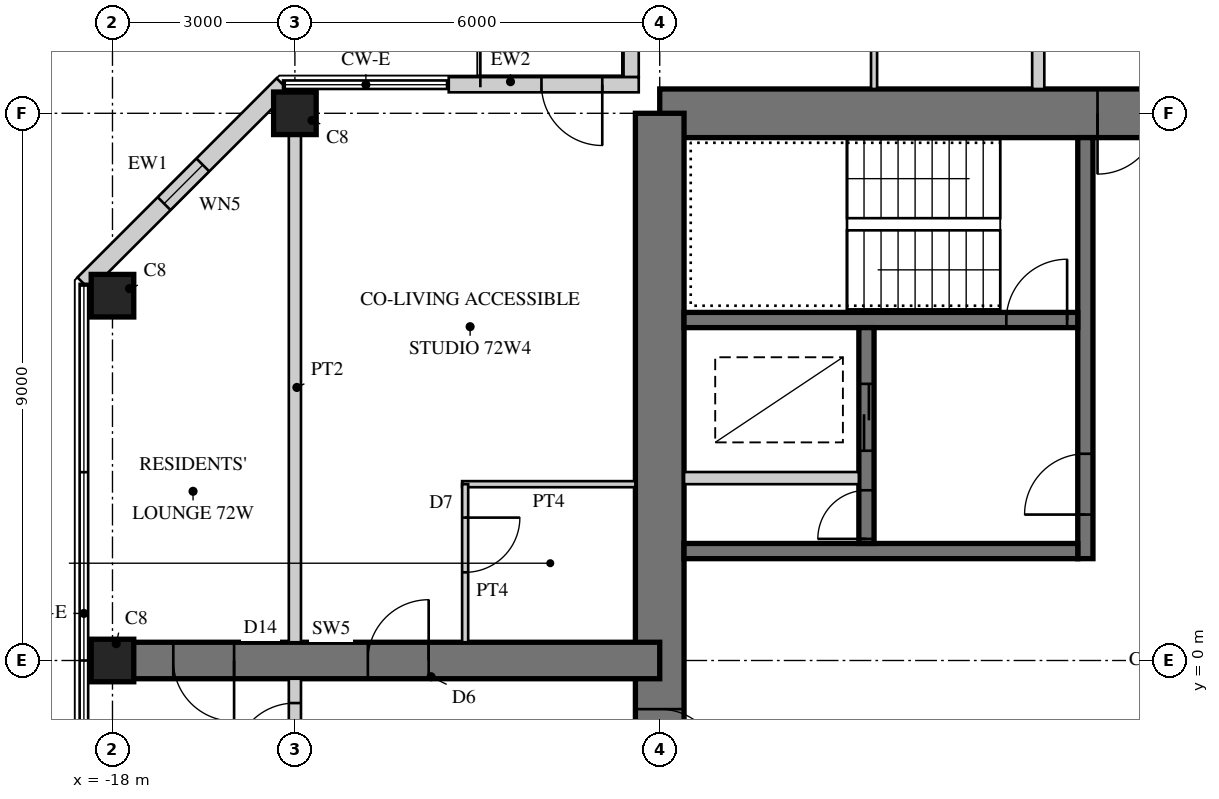
"""IFC4 building model, lengths in metres.
Left out: names, types, materials, properties, quantities, classifications, styles, units other than length and angle.
Written with IfcOpenShell. Run it as: python <this file> out.ifc"""

import sys

from ifc_helpers import new_model, si_unit, direction, frame, frame_2d, origin, origin_2d, place, context, subcontext, project, spatial, rectangle, hollow_rectangle, extrude, element, fill, save


model = new_model("IFC4")
c1 = context("Model", 3, precision=1e-05, world=origin(), true_north=direction((0.0, 1.0)))
c2 = subcontext(c1, "Body", "Model", "MODEL_VIEW")
j1 = project(units=[si_unit("LENGTHUNIT", "METRE"), si_unit("PLANEANGLEUNIT", "RADIAN")], contexts=[c1])
p1 = place(None, origin())
s1 = spatial("IfcSite", under=j1, at=p1, CompositionType="ELEMENT")
p2 = place(p1, origin())
s2 = spatial("IfcBuilding", under=s1, at=p2, CompositionType="ELEMENT")
p3 = place(p2, frame((0.0, 0.0, 278.1)))
s3 = spatial("IfcBuildingStorey", under=s2, at=p3, CompositionType="ELEMENT", Elevation=278.1)
p4 = place(p3, frame((9.0, 9.0, 0.0), z_axis=(0.0, 0.0, 1.0), x_axis=(-1.0, 0.0, 0.0)))
e1 = element("IfcWall", 1, at=p4, inside=s3, PredefinedType="SHEAR", context=c2, shape_type="SweptSolid", body=[
    extrude(rectangle(XDim=18.0, YDim=0.8, at=frame_2d((9.0, 0.0))), origin(), (0.0, 0.0, 1.0), 3.4),
])
p5 = place(p4, frame((9.8, 0.0, 0.0)))
e2 = element("IfcOpeningElement", 2, at=p5, cuts=e1, PredefinedType="OPENING", context=c2, shape_type="SweptSolid", body=[
    extrude(rectangle(XDim=1.0, YDim=2.4, at=frame_2d((0.5, 1.2))), frame((0.0, 0.41, 0.0), z_axis=(0.0, -1.0, 0.0), x_axis=(1.0, 0.0, 0.0)), (0.0, 0.0, 1.0), 0.82),
])
p6 = place(p3, frame((-9.0, 9.0, 0.0), z_axis=(0.0, 0.0, 1.0), x_axis=(0.0, -1.0, 0.0)))
e3 = element("IfcWall", 3, at=p6, inside=s3, PredefinedType="SHEAR", context=c2, shape_type="SweptSolid", body=[
    extrude(rectangle(XDim=18.0, YDim=0.8, at=frame_2d((9.0, 0.0))), origin(), (0.0, 0.0, 1.0), 3.4),
])
p7 = place(p6, frame((9.8, 0.0, 0.0)))
e4 = element("IfcOpeningElement", 4, at=p7, cuts=e3, PredefinedType="OPENING", context=c2, shape_type="SweptSolid", body=[
    extrude(rectangle(XDim=1.0, YDim=2.4, at=frame_2d((0.5, 1.2))), frame((0.0, 0.41, 0.0), z_axis=(0.0, -1.0, 0.0), x_axis=(1.0, 0.0, 0.0)), (0.0, 0.0, 1.0), 0.82),
])
p8 = place(p3, frame((-2.0, 1.675, 0.0), z_axis=(0.0, 0.0, 1.0), x_axis=(0.0, 1.0, 0.0)))
e5 = element("IfcWall", 5, at=p8, inside=s3, PredefinedType="SHEAR", context=c2, shape_type="SweptSolid", body=[
    extrude(rectangle(XDim=6.925, YDim=0.25, at=frame_2d((3.462, 0.0))), origin(), (0.0, 0.0, 1.0), 3.4),
])
p9 = place(p8, frame((0.725, 0.0, 0.0)))
e6 = element("IfcOpeningElement", 6, at=p9, cuts=e5, PredefinedType="OPENING", context=c2, shape_type="SweptSolid", body=[
    extrude(rectangle(XDim=1.0, YDim=2.1, at=frame_2d((0.5, 1.05))), frame((0.0, 0.135, 0.0), z_axis=(0.0, -1.0, 0.0), x_axis=(1.0, 0.0, 0.0)), (0.0, 0.0, 1.0), 0.27),
])
p10 = place(p3, frame((-2.125, 1.8, 0.0), z_axis=(0.0, 0.0, 1.0), x_axis=(-1.0, 0.0, 0.0)))
e7 = element("IfcWall", 7, at=p10, inside=s3, PredefinedType="SHEAR", context=c2, shape_type="SweptSolid", body=[
    extrude(rectangle(XDim=6.475, YDim=0.25, at=frame_2d((3.238, 0.0))), origin(), (0.0, 0.0, 1.0), 3.4),
])
p11 = place(p3, frame((-2.125, 5.6, 0.0), z_axis=(0.0, 0.0, 1.0), x_axis=(-1.0, 0.0, 0.0)))
e8 = element("IfcWall", 8, at=p11, inside=s3, PredefinedType="SHEAR", context=c2, shape_type="SweptSolid", body=[
    extrude(rectangle(XDim=6.475, YDim=0.25, at=frame_2d((3.238, 0.0))), origin(), (0.0, 0.0, 1.0), 3.4),
])
p12 = place(p11, frame((0.175, 0.0, 0.0)))
e9 = element("IfcOpeningElement", 9, at=p12, cuts=e8, PredefinedType="OPENING", context=c2, shape_type="SweptSolid", body=[
    extrude(rectangle(XDim=1.0, YDim=2.1, at=frame_2d((0.5, 1.05))), frame((0.0, 0.135, 0.0), z_axis=(0.0, -1.0, 0.0), x_axis=(1.0, 0.0, 0.0)), (0.0, 0.0, 1.0), 0.27),
])
p13 = place(p3, frame((-5.6, 1.925, 0.0), z_axis=(0.0, 0.0, 1.0), x_axis=(0.0, 1.0, 0.0)))
e10 = element("IfcWall", 10, at=p13, inside=s3, PredefinedType="SHEAR", context=c2, shape_type="SweptSolid", body=[
    extrude(rectangle(XDim=3.55, YDim=0.25, at=frame_2d((1.775, 0.0))), origin(), (0.0, 0.0, 1.0), 3.4),
])
p14 = place(p13, frame((1.525, 0.0, 0.0)))
e11 = element("IfcOpeningElement", 11, at=p14, cuts=e10, PredefinedType="OPENING", context=c2, shape_type="SweptSolid", body=[
    extrude(rectangle(XDim=1.1, YDim=2.2, at=frame_2d((0.55, 1.1))), frame((0.0, 0.135, 0.0), z_axis=(0.0, -1.0, 0.0), x_axis=(1.0, 0.0, 0.0)), (0.0, 0.0, 1.0), 0.27),
])
p15 = place(p13, frame((0.075, 0.0, 0.0)))
e12 = element("IfcOpeningElement", 12, at=p15, cuts=e10, PredefinedType="OPENING", context=c2, shape_type="SweptSolid", body=[
    extrude(rectangle(XDim=0.8, YDim=2.1, at=frame_2d((0.4, 1.05))), frame((0.0, 0.135, 0.0), z_axis=(0.0, -1.0, 0.0), x_axis=(1.0, 0.0, 0.0)), (0.0, 0.0, 1.0), 0.27),
])
p16 = place(p3, frame((-5.725, 3.0, 0.0), z_axis=(0.0, 0.0, 1.0), x_axis=(-1.0, 0.0, 0.0)))
e13 = element("IfcWall", 13, at=p16, inside=s3, PredefinedType="PARTITIONING", context=c2, shape_type="SweptSolid", body=[
    extrude(rectangle(XDim=2.875, YDim=0.2, at=frame_2d((1.438, 0.0))), origin(), (0.0, 0.0, 1.0), 3.4),
])
p17 = place(p3, frame((-9.0, 0.0, 0.0), z_axis=(0.0, 0.0, 1.0), x_axis=(-1.0, 0.0, 0.0)))
e14 = element("IfcWall", 14, at=p17, inside=s3, PredefinedType="SHEAR", context=c2, shape_type="SweptSolid", body=[
    extrude(rectangle(XDim=9.0, YDim=0.6, at=frame_2d((4.5, 0.0))), origin(), (0.0, 0.0, 1.0), 3.4),
])
p18 = place(p17, frame((3.8, 0.0, 0.0)))
e15 = element("IfcOpeningElement", 15, at=p18, cuts=e14, PredefinedType="OPENING", context=c2, shape_type="SweptSolid", body=[
    extrude(rectangle(XDim=1.0, YDim=2.15, at=frame_2d((0.5, 1.075))), frame((0.0, 0.31, 0.0), z_axis=(0.0, -1.0, 0.0), x_axis=(1.0, 0.0, 0.0)), (0.0, 0.0, 1.0), 0.62),
])
p19 = place(p17, frame((7.0, 0.0, 0.0)))
e16 = element("IfcOpeningElement", 16, at=p19, cuts=e14, PredefinedType="OPENING", context=c2, shape_type="SweptSolid", body=[
    extrude(rectangle(XDim=1.0, YDim=2.2, at=frame_2d((0.5, 1.1))), frame((0.0, 0.31, 0.0), z_axis=(0.0, -1.0, 0.0), x_axis=(1.0, 0.0, 0.0)), (0.0, 0.0, 1.0), 0.62),
])
for number, where, z_axis, x_axis in (
    (17, (-15.0, 9.0, 0.0), (0.0, 0.0, 1.0), (1.0, 0.0, 0.0)),
    (18, (-18.0, 6.0, 0.0), (0.0, 0.0, 1.0), (1.0, 0.0, 0.0)),
    (19, (-18.0, 0.0, 0.0), (0.0, 0.0, 1.0), (1.0, 0.0, 0.0)),
):
    element("IfcColumn", number, at=place(p3, frame(where, z_axis=z_axis, x_axis=x_axis)), inside=s3, PredefinedType="COLUMN", context=c2, shape_type="SweptSolid", body=[
        extrude(rectangle(XDim=0.7, YDim=0.7, at=origin_2d()), origin(), (0.0, 0.0, 1.0), 3.4),
    ])
p20 = place(p3, frame((-9.47, 12.47, 0.0), z_axis=(0.0, 0.0, 1.0), x_axis=(0.0, -1.0, 0.0)))
e20 = element("IfcWall", 20, at=p20, inside=s3, PredefinedType="SOLIDWALL", context=c2, shape_type="SweptSolid", body=[
    extrude(rectangle(XDim=2.875, YDim=0.25, at=frame_2d((1.438, 0.0))), origin(), (0.0, 0.0, 1.0), 3.22),
])
p21 = place(p20, frame((0.6, 0.0, 0.0)))
e21 = element("IfcOpeningElement", 21, at=p21, cuts=e20, PredefinedType="OPENING", context=c2, shape_type="SweptSolid", body=[
    extrude(rectangle(XDim=1.0, YDim=2.2, at=frame_2d((0.5, 1.1))), frame((0.0, 0.135, 0.0), z_axis=(0.0, -1.0, 0.0), x_axis=(1.0, 0.0, 0.0)), (0.0, 0.0, 1.0), 0.27),
])
p22 = place(p3, frame((-9.345, 9.47, 0.0), z_axis=(0.0, 0.0, 1.0), x_axis=(-1.0, 0.0, 0.0)))
e22 = element("IfcWall", 22, at=p22, inside=s3, PredefinedType="SOLIDWALL", context=c2, shape_type="SweptSolid", body=[
    extrude(rectangle(XDim=3.125, YDim=0.25, at=frame_2d((1.562, 0.0))), origin(), (0.0, 0.0, 1.0), 3.22),
])
p23 = place(p22, frame((0.6, 0.0, 0.0)))
e23 = element("IfcOpeningElement", 23, at=p23, cuts=e22, PredefinedType="OPENING", context=c2, shape_type="SweptSolid", body=[
    extrude(rectangle(XDim=1.0, YDim=2.2, at=frame_2d((0.5, 1.1))), frame((0.0, 0.135, 0.0), z_axis=(0.0, -1.0, 0.0), x_axis=(1.0, 0.0, 0.0)), (0.0, 0.0, 1.0), 0.27),
])
p24 = place(p3, frame((-15.195, 9.47, 0.0), z_axis=(0.0, 0.0, 1.0), x_axis=(-0.707106781187, -0.707106781187, 0.0)))
e24 = element("IfcWall", 24, at=p24, inside=s3, PredefinedType="SOLIDWALL", context=c2, shape_type="SweptSolid", body=[
    extrude(rectangle(XDim=4.632, YDim=0.3, at=frame_2d((2.316, 0.0))), origin(), (0.0, 0.0, 1.0), 3.22),
])
p25 = place(p24, frame((1.866, 0.0, 0.3)))
e25 = element("IfcOpeningElement", 25, at=p25, cuts=e24, PredefinedType="OPENING", context=c2, shape_type="SweptSolid", body=[
    extrude(rectangle(XDim=0.9, YDim=2.4, at=frame_2d((0.45, 1.2))), frame((0.0, 0.16, 0.0), z_axis=(0.0, -1.0, 0.0), x_axis=(1.0, 0.0, 0.0)), (0.0, 0.0, 1.0), 0.32),
])
p26 = place(p3, frame((-5.475, 9.4, 0.0), z_axis=(0.0, 0.0, 1.0), x_axis=(0.0, 1.0, 0.0)))
e26 = element("IfcWall", 26, at=p26, inside=s3, PredefinedType="PARTITIONING", context=c2, shape_type="SweptSolid", body=[
    extrude(rectangle(XDim=2.85, YDim=0.1, at=frame_2d((1.425, 0.0))), origin(), (0.0, 0.0, 1.0), 3.22),
])
p27 = place(p3, frame((-2.775, 9.4, 0.0), z_axis=(0.0, 0.0, 1.0), x_axis=(0.0, 1.0, 0.0)))
e27 = element("IfcWall", 27, at=p27, inside=s3, PredefinedType="SOLIDWALL", context=c2, shape_type="SweptSolid", body=[
    extrude(rectangle(XDim=5.6, YDim=0.2, at=frame_2d((2.8, 0.0))), origin(), (0.0, 0.0, 1.0), 3.22),
])
p28 = place(p27, frame((3.4, 0.0, 0.0)))
e28 = element("IfcOpeningElement", 28, at=p28, cuts=e27, PredefinedType="OPENING", context=c2, shape_type="SweptSolid", body=[
    extrude(rectangle(XDim=1.0, YDim=2.15, at=frame_2d((0.5, 1.075))), frame((0.0, 0.11, 0.0), z_axis=(0.0, -1.0, 0.0), x_axis=(1.0, 0.0, 0.0)), (0.0, 0.0, 1.0), 0.22),
])
p29 = place(p3, frame((-9.4, 2.9, 0.0), z_axis=(0.0, 0.0, 1.0), x_axis=(-1.0, 0.0, 0.0)))
e29 = element("IfcWall", 29, at=p29, inside=s3, PredefinedType="PARTITIONING", context=c2, shape_type="SweptSolid", body=[
    extrude(rectangle(XDim=2.85, YDim=0.1, at=frame_2d((1.425, 0.0))), origin(), (0.0, 0.0, 1.0), 3.22),
])
p30 = place(p3, frame((-12.2, 2.9, 0.0), z_axis=(0.0, 0.0, 1.0), x_axis=(0.0, -1.0, 0.0)))
e30 = element("IfcWall", 30, at=p30, inside=s3, PredefinedType="PARTITIONING", context=c2, shape_type="SweptSolid", body=[
    extrude(rectangle(XDim=2.6, YDim=0.1, at=frame_2d((1.3, 0.0))), origin(), (0.0, 0.0, 1.0), 3.22),
])
p31 = place(p30, frame((0.55, 0.0, 0.0)))
e31 = element("IfcOpeningElement", 31, at=p31, cuts=e30, PredefinedType="OPENING", context=c2, shape_type="SweptSolid", body=[
    extrude(rectangle(XDim=0.9, YDim=2.1, at=frame_2d((0.45, 1.05))), frame((0.0, 0.06, 0.0), z_axis=(0.0, -1.0, 0.0), x_axis=(1.0, 0.0, 0.0)), (0.0, 0.0, 1.0), 0.12),
])
p32 = place(p3, frame((-15.0, 8.65, 0.0), z_axis=(0.0, 0.0, 1.0), x_axis=(0.0, -1.0, 0.0)))
e32 = element("IfcWall", 32, at=p32, inside=s3, PredefinedType="SOLIDWALL", context=c2, shape_type="SweptSolid", body=[
    extrude(rectangle(XDim=8.35, YDim=0.2, at=frame_2d((4.175, 0.0))), origin(), (0.0, 0.0, 1.0), 2.52),
])
p33 = place(p3, frame((-15.0, -0.3, 0.0), z_axis=(0.0, 0.0, 1.0), x_axis=(0.0, -1.0, 0.0)))
e33 = element("IfcWall", 33, at=p33, inside=s3, PredefinedType="SOLIDWALL", context=c2, shape_type="SweptSolid", body=[
    extrude(rectangle(XDim=8.35, YDim=0.2, at=frame_2d((4.175, 0.0))), origin(), (0.0, 0.0, 1.0), 2.52),
])
p34 = place(p33, frame((0.4, 0.0, 0.0)))
e34 = element("IfcOpeningElement", 34, at=p34, cuts=e33, PredefinedType="OPENING", context=c2, shape_type="SweptSolid", body=[
    extrude(rectangle(XDim=1.0, YDim=2.2, at=frame_2d((0.5, 1.1))), frame((0.0, 0.11, 0.0), z_axis=(0.0, -1.0, 0.0), x_axis=(1.0, 0.0, 0.0)), (0.0, 0.0, 1.0), 0.22),
])
p35 = place(p23, origin())
e35 = element("IfcDoor", 35, at=p35, inside=s3, OperationType="SINGLE_SWING_LEFT", PredefinedType="DOOR", context=c2, shape_type="SweptSolid", body=[
    extrude(hollow_rectangle(XDim=1.0, YDim=2.2, WallThickness=0.06, at=frame_2d((0.5, 1.1))), frame((0.0, 0.025, 0.0), z_axis=(0.0, -1.0, 0.0), x_axis=(1.0, 0.0, 0.0)), (0.0, 0.0, 1.0), 0.05),
    extrude(rectangle(XDim=0.879, YDim=2.079, at=frame_2d((0.5, 1.1))), frame((0.0, 0.025, 0.0), z_axis=(0.0, -1.0, 0.0), x_axis=(1.0, 0.0, 0.0)), (0.0, 0.0, 1.0), 0.05),
])
fill(e23, e35)
p36 = place(p25, origin())
e36 = element("IfcWindow", 36, at=p36, inside=s3, PartitioningType="SINGLE_PANEL", PredefinedType="WINDOW", context=c2, shape_type="SweptSolid", body=[
    extrude(hollow_rectangle(XDim=0.9, YDim=2.4, WallThickness=0.06, at=frame_2d((0.45, 1.2))), frame((0.0, 0.03, 0.0), z_axis=(0.0, -1.0, 0.0), x_axis=(1.0, 0.0, 0.0)), (0.0, 0.0, 1.0), 0.06),
    extrude(rectangle(XDim=0.779, YDim=2.279, at=frame_2d((0.45, 1.2))), frame((0.0, 0.03, 0.0), z_axis=(0.0, -1.0, 0.0), x_axis=(1.0, 0.0, 0.0)), (0.0, 0.0, 1.0), 0.06),
])
fill(e25, e36)
p37 = place(p31, origin())
e37 = element("IfcDoor", 37, at=p37, inside=s3, OperationType="SINGLE_SWING_LEFT", PredefinedType="DOOR", context=c2, shape_type="SweptSolid", body=[
    extrude(rectangle(XDim=0.9, YDim=2.1, at=frame_2d((0.45, 1.05))), frame((0.0, 0.025, 0.0), z_axis=(0.0, -1.0, 0.0), x_axis=(1.0, 0.0, 0.0)), (0.0, 0.0, 1.0), 0.05),
])
fill(e31, e37)
p38 = place(p34, frame((1.0, 0.0, 0.0), z_axis=(0.0, 0.0, 1.0), x_axis=(-1.0, 0.0, 0.0)))
e38 = element("IfcDoor", 38, at=p38, inside=s3, OperationType="SINGLE_SWING_LEFT", PredefinedType="DOOR", context=c2, shape_type="SweptSolid", body=[
    extrude(rectangle(XDim=1.0, YDim=2.2, at=frame_2d((0.5, 1.1))), frame((0.0, 0.025, 0.0), z_axis=(0.0, -1.0, 0.0), x_axis=(1.0, 0.0, 0.0)), (0.0, 0.0, 1.0), 0.05),
])
fill(e34, e38)
p39 = place(p18, frame((1.0, 0.0, 0.0), z_axis=(0.0, 0.0, 1.0), x_axis=(-1.0, 0.0, 0.0)))
e39 = element("IfcDoor", 39, at=p39, inside=s3, OperationType="SINGLE_SWING_RIGHT", PredefinedType="DOOR", context=c2, shape_type="SweptSolid", body=[
    extrude(rectangle(XDim=1.0, YDim=2.15, at=frame_2d((0.5, 1.075))), frame((0.0, 0.025, 0.0), z_axis=(0.0, -1.0, 0.0), x_axis=(1.0, 0.0, 0.0)), (0.0, 0.0, 1.0), 0.05),
])
fill(e15, e39)
p40 = place(p19, origin())
e40 = element("IfcDoor", 40, at=p40, inside=s3, OperationType="SINGLE_SWING_LEFT", PredefinedType="DOOR", context=c2, shape_type="SweptSolid", body=[
    extrude(rectangle(XDim=1.0, YDim=2.2, at=frame_2d((0.5, 1.1))), frame((0.0, 0.025, 0.0), z_axis=(0.0, -1.0, 0.0), x_axis=(1.0, 0.0, 0.0)), (0.0, 0.0, 1.0), 0.05),
])
fill(e16, e40)
p41 = place(p5, origin())
e41 = element("IfcDoor", 41, at=p41, inside=s3, OperationType="SINGLE_SWING_RIGHT", PredefinedType="DOOR", context=c2, shape_type="SweptSolid", body=[
    extrude(rectangle(XDim=1.0, YDim=2.4, at=frame_2d((0.5, 1.2))), frame((0.0, 0.055, 0.0), z_axis=(0.0, -1.0, 0.0), x_axis=(1.0, 0.0, 0.0)), (0.0, 0.0, 1.0), 0.05),
])
fill(e2, e41)
p42 = place(p7, origin())
e42 = element("IfcDoor", 42, at=p42, inside=s3, OperationType="SINGLE_SWING_RIGHT", PredefinedType="DOOR", context=c2, shape_type="SweptSolid", body=[
    extrude(rectangle(XDim=1.0, YDim=2.4, at=frame_2d((0.5, 1.2))), frame((0.0, 0.055, 0.0), z_axis=(0.0, -1.0, 0.0), x_axis=(1.0, 0.0, 0.0)), (0.0, 0.0, 1.0), 0.05),
])
fill(e4, e42)
p43 = place(p9, origin())
e43 = element("IfcDoor", 43, at=p43, inside=s3, OperationType="SINGLE_SWING_LEFT", PredefinedType="DOOR", context=c2, shape_type="SweptSolid", body=[
    extrude(rectangle(XDim=1.0, YDim=2.1, at=frame_2d((0.5, 1.05))), frame((0.0, 0.025, 0.0), z_axis=(0.0, -1.0, 0.0), x_axis=(1.0, 0.0, 0.0)), (0.0, 0.0, 1.0), 0.05),
])
fill(e6, e43)
p44 = place(p12, frame((1.0, 0.0, 0.0), z_axis=(0.0, 0.0, 1.0), x_axis=(-1.0, 0.0, 0.0)))
e44 = element("IfcDoor", 44, at=p44, inside=s3, OperationType="SINGLE_SWING_RIGHT", PredefinedType="DOOR", context=c2, shape_type="SweptSolid", body=[
    extrude(rectangle(XDim=1.0, YDim=2.1, at=frame_2d((0.5, 1.05))), frame((0.0, 0.025, 0.0), z_axis=(0.0, -1.0, 0.0), x_axis=(1.0, 0.0, 0.0)), (0.0, 0.0, 1.0), 0.05),
])
fill(e9, e44)
p45 = place(p14, origin())
e45 = element("IfcDoor", 45, at=p45, inside=s3, OperationType="DOUBLE_DOOR_SLIDING", PredefinedType="DOOR", context=c2, shape_type="SweptSolid", body=[
    extrude(rectangle(XDim=1.1, YDim=2.2, at=frame_2d((0.55, 1.1))), frame((0.0, 0.025, 0.0), z_axis=(0.0, -1.0, 0.0), x_axis=(1.0, 0.0, 0.0)), (0.0, 0.0, 1.0), 0.05),
])
fill(e11, e45)
p46 = place(p15, origin())
e46 = element("IfcDoor", 46, at=p46, inside=s3, OperationType="SINGLE_SWING_LEFT", PredefinedType="DOOR", context=c2, shape_type="SweptSolid", body=[
    extrude(rectangle(XDim=0.8, YDim=2.1, at=frame_2d((0.4, 1.05))), frame((0.0, 0.025, 0.0), z_axis=(0.0, -1.0, 0.0), x_axis=(1.0, 0.0, 0.0)), (0.0, 0.0, 1.0), 0.05),
])
fill(e12, e46)
save(model, sys.argv[1])
